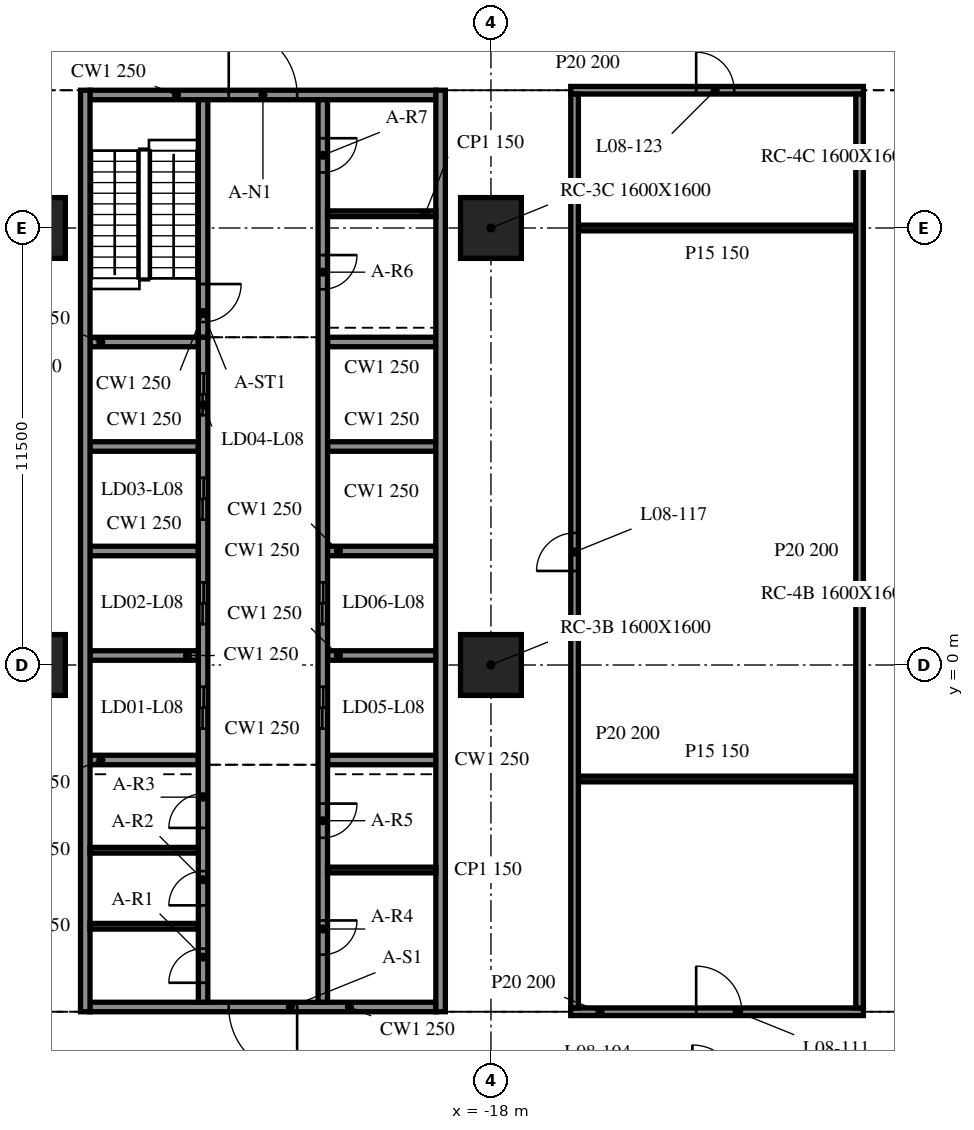
"""IFC4 building model, lengths in metres.
Left out: names, types, materials, properties, quantities, classifications, styles, units other than length and angle.
Written with IfcOpenShell. Run it as: python <this file> out.ifc"""

import sys

from ifc_helpers import new_model, si_unit, direction, frame, frame_2d, origin, origin_2d, place, context, subcontext, project, spatial, rectangle, extrude, element, fill, save


model = new_model("IFC4")
c1 = context("Model", 3, precision=1e-05, world=origin(), true_north=direction((0.0, 1.0)))
c2 = subcontext(c1, "Body", "Model", "MODEL_VIEW")
j1 = project(units=[si_unit("LENGTHUNIT", "METRE"), si_unit("PLANEANGLEUNIT", "RADIAN")], contexts=[c1])
p1 = place(None, origin())
s1 = spatial("IfcSite", under=j1, at=p1, CompositionType="ELEMENT")
p2 = place(p1, origin())
s2 = spatial("IfcBuilding", under=s1, at=p2, CompositionType="ELEMENT")
p3 = place(p2, frame((0.0, 0.0, 37.3)))
s3 = spatial("IfcBuildingStorey", under=s2, at=p3, CompositionType="ELEMENT", Elevation=37.3)
for number, where, z_axis, x_axis in (
    (1, (-30.0, 0.0, -0.34), (0.0, 0.0, 1.0), (1.0, 0.0, 0.0)),
    (2, (-30.0, 11.5, -0.34), (0.0, 0.0, 1.0), (1.0, 0.0, 0.0)),
    (3, (-18.0, 0.0, -0.34), (0.0, 0.0, 1.0), (1.0, 0.0, 0.0)),
    (4, (-18.0, 11.5, -0.34), (0.0, 0.0, 1.0), (1.0, 0.0, 0.0)),
):
    element("IfcColumn", number, at=place(p3, frame(where, z_axis=z_axis, x_axis=x_axis)), inside=s3, PredefinedType="COLUMN", context=c2, shape_type="SweptSolid", body=[
        extrude(rectangle(XDim=1.6, YDim=1.6, at=origin_2d()), origin(), (0.0, 0.0, 1.0), 4.09),
    ])
for number, where, z_axis, x_axis in (
    (5, (-28.675, 15.125, 0.0), (0.0, 0.0, 1.0), (0.0, -1.0, 0.0)),
    (6, (-19.325, -9.125, 0.0), (0.0, 0.0, 1.0), (0.0, 1.0, 0.0)),
):
    element("IfcWall", number, at=place(p3, frame(where, z_axis=z_axis, x_axis=x_axis)), inside=s3, PredefinedType="SOLIDWALL", context=c2, shape_type="SweptSolid", body=[
        extrude(rectangle(XDim=24.25, YDim=0.25, at=frame_2d((12.125, 0.0))), origin(), (0.0, 0.0, 1.0), 3.75),
    ])
p4 = place(p3, frame((-19.45, -9.0, 0.0), z_axis=(0.0, 0.0, 1.0), x_axis=(-1.0, 0.0, 0.0)))
e7 = element("IfcWall", 7, at=p4, inside=s3, PredefinedType="SOLIDWALL", context=c2, shape_type="SweptSolid", body=[
    extrude(rectangle(XDim=9.1, YDim=0.25, at=frame_2d((4.55, 0.0))), origin(), (0.0, 0.0, 1.0), 3.75),
])
p5 = place(p4, frame((3.65, 0.0, 0.0)))
e8 = element("IfcOpeningElement", 8, at=p5, cuts=e7, PredefinedType="OPENING", context=c2, shape_type="SweptSolid", body=[
    extrude(rectangle(XDim=1.8, YDim=2.1, at=frame_2d((0.9, 1.05))), frame((0.0, 0.135, 0.0), z_axis=(0.0, -1.0, 0.0), x_axis=(1.0, 0.0, 0.0)), (0.0, 0.0, 1.0), 0.27),
])
p6 = place(p3, frame((-28.55, 15.0, 0.0), z_axis=(0.0, 0.0, 1.0), x_axis=(1.0, 0.0, 0.0)))
e9 = element("IfcWall", 9, at=p6, inside=s3, PredefinedType="SOLIDWALL", context=c2, shape_type="SweptSolid", body=[
    extrude(rectangle(XDim=9.1, YDim=0.25, at=frame_2d((4.55, 0.0))), origin(), (0.0, 0.0, 1.0), 3.75),
])
p7 = place(p6, frame((3.65, 0.0, 0.0)))
e10 = element("IfcOpeningElement", 10, at=p7, cuts=e9, PredefinedType="OPENING", context=c2, shape_type="SweptSolid", body=[
    extrude(rectangle(XDim=1.8, YDim=2.1, at=frame_2d((0.9, 1.05))), frame((0.0, 0.135, 0.0), z_axis=(0.0, -1.0, 0.0), x_axis=(1.0, 0.0, 0.0)), (0.0, 0.0, 1.0), 0.27),
])
p8 = place(p3, frame((-25.575, -8.875, 0.0), z_axis=(0.0, 0.0, 1.0), x_axis=(0.0, 1.0, 0.0)))
e11 = element("IfcWall", 11, at=p8, inside=s3, PredefinedType="SOLIDWALL", context=c2, shape_type="SweptSolid", body=[
    extrude(rectangle(XDim=17.5, YDim=0.25, at=frame_2d((8.75, 0.0))), origin(), (0.0, 0.0, 1.0), 3.75),
])
p9 = place(p8, frame((7.2, 0.0, 0.0)))
e12 = element("IfcOpeningElement", 12, at=p9, cuts=e11, PredefinedType="OPENING", context=c2, shape_type="SweptSolid", body=[
    extrude(rectangle(XDim=1.1, YDim=2.1, at=frame_2d((0.55, 1.05))), frame((0.0, 0.135, 0.0), z_axis=(0.0, -1.0, 0.0), x_axis=(1.0, 0.0, 0.0)), (0.0, 0.0, 1.0), 0.27),
])
p10 = place(p8, frame((9.95, 0.0, 0.0)))
e13 = element("IfcOpeningElement", 13, at=p10, cuts=e11, PredefinedType="OPENING", context=c2, shape_type="SweptSolid", body=[
    extrude(rectangle(XDim=1.1, YDim=2.1, at=frame_2d((0.55, 1.05))), frame((0.0, 0.135, 0.0), z_axis=(0.0, -1.0, 0.0), x_axis=(1.0, 0.0, 0.0)), (0.0, 0.0, 1.0), 0.27),
])
p11 = place(p8, frame((12.7, 0.0, 0.0)))
e14 = element("IfcOpeningElement", 14, at=p11, cuts=e11, PredefinedType="OPENING", context=c2, shape_type="SweptSolid", body=[
    extrude(rectangle(XDim=1.1, YDim=2.1, at=frame_2d((0.55, 1.05))), frame((0.0, 0.135, 0.0), z_axis=(0.0, -1.0, 0.0), x_axis=(1.0, 0.0, 0.0)), (0.0, 0.0, 1.0), 0.27),
])
p12 = place(p8, frame((15.45, 0.0, 0.0)))
e15 = element("IfcOpeningElement", 15, at=p12, cuts=e11, PredefinedType="OPENING", context=c2, shape_type="SweptSolid", body=[
    extrude(rectangle(XDim=1.1, YDim=2.1, at=frame_2d((0.55, 1.05))), frame((0.0, 0.135, 0.0), z_axis=(0.0, -1.0, 0.0), x_axis=(1.0, 0.0, 0.0)), (0.0, 0.0, 1.0), 0.27),
])
p13 = place(p8, frame((0.512, 0.0, 0.0)))
e16 = element("IfcOpeningElement", 16, at=p13, cuts=e11, PredefinedType="OPENING", context=c2, shape_type="SweptSolid", body=[
    extrude(rectangle(XDim=0.9, YDim=2.1, at=frame_2d((0.45, 1.05))), frame((0.0, 0.135, 0.0), z_axis=(0.0, -1.0, 0.0), x_axis=(1.0, 0.0, 0.0)), (0.0, 0.0, 1.0), 0.27),
])
p14 = place(p8, frame((2.55, 0.0, 0.0)))
e17 = element("IfcOpeningElement", 17, at=p14, cuts=e11, PredefinedType="OPENING", context=c2, shape_type="SweptSolid", body=[
    extrude(rectangle(XDim=0.9, YDim=2.1, at=frame_2d((0.45, 1.05))), frame((0.0, 0.135, 0.0), z_axis=(0.0, -1.0, 0.0), x_axis=(1.0, 0.0, 0.0)), (0.0, 0.0, 1.0), 0.27),
])
p15 = place(p8, frame((4.587, 0.0, 0.0)))
e18 = element("IfcOpeningElement", 18, at=p15, cuts=e11, PredefinedType="OPENING", context=c2, shape_type="SweptSolid", body=[
    extrude(rectangle(XDim=0.9, YDim=2.1, at=frame_2d((0.45, 1.05))), frame((0.0, 0.135, 0.0), z_axis=(0.0, -1.0, 0.0), x_axis=(1.0, 0.0, 0.0)), (0.0, 0.0, 1.0), 0.27),
])
p16 = place(p3, frame((-25.575, 14.875, 0.0), z_axis=(0.0, 0.0, 1.0), x_axis=(0.0, -1.0, 0.0)))
e19 = element("IfcWall", 19, at=p16, inside=s3, PredefinedType="SOLIDWALL", context=c2, shape_type="SweptSolid", body=[
    extrude(rectangle(XDim=6.25, YDim=0.25, at=frame_2d((3.125, 0.0))), origin(), (0.0, 0.0, 1.0), 3.75),
])
p17 = place(p16, frame((4.85, 0.0, 0.0)))
e20 = element("IfcOpeningElement", 20, at=p17, cuts=e19, PredefinedType="OPENING", context=c2, shape_type="SweptSolid", body=[
    extrude(rectangle(XDim=1.0, YDim=2.1, at=frame_2d((0.5, 1.05))), frame((0.0, 0.135, 0.0), z_axis=(0.0, -1.0, 0.0), x_axis=(1.0, 0.0, 0.0)), (0.0, 0.0, 1.0), 0.27),
])
p18 = place(p3, frame((-22.425, 14.875, 0.0), z_axis=(0.0, 0.0, 1.0), x_axis=(0.0, -1.0, 0.0)))
e21 = element("IfcWall", 21, at=p18, inside=s3, PredefinedType="SOLIDWALL", context=c2, shape_type="SweptSolid", body=[
    extrude(rectangle(XDim=23.75, YDim=0.25, at=frame_2d((11.875, 0.0))), origin(), (0.0, 0.0, 1.0), 3.75),
])
p19 = place(p18, frame((15.45, 0.0, 0.0)))
e22 = element("IfcOpeningElement", 22, at=p19, cuts=e21, PredefinedType="OPENING", context=c2, shape_type="SweptSolid", body=[
    extrude(rectangle(XDim=1.1, YDim=2.1, at=frame_2d((0.55, 1.05))), frame((0.0, 0.135, 0.0), z_axis=(0.0, -1.0, 0.0), x_axis=(1.0, 0.0, 0.0)), (0.0, 0.0, 1.0), 0.27),
])
p20 = place(p18, frame((12.7, 0.0, 0.0)))
e23 = element("IfcOpeningElement", 23, at=p20, cuts=e21, PredefinedType="OPENING", context=c2, shape_type="SweptSolid", body=[
    extrude(rectangle(XDim=1.1, YDim=2.1, at=frame_2d((0.55, 1.05))), frame((0.0, 0.135, 0.0), z_axis=(0.0, -1.0, 0.0), x_axis=(1.0, 0.0, 0.0)), (0.0, 0.0, 1.0), 0.27),
])
p21 = place(p18, frame((21.597, 0.0, 0.0)))
e24 = element("IfcOpeningElement", 24, at=p21, cuts=e21, PredefinedType="OPENING", context=c2, shape_type="SweptSolid", body=[
    extrude(rectangle(XDim=0.9, YDim=2.1, at=frame_2d((0.45, 1.05))), frame((0.0, 0.135, 0.0), z_axis=(0.0, -1.0, 0.0), x_axis=(1.0, 0.0, 0.0)), (0.0, 0.0, 1.0), 0.27),
])
p22 = place(p18, frame((18.522, 0.0, 0.0)))
e25 = element("IfcOpeningElement", 25, at=p22, cuts=e21, PredefinedType="OPENING", context=c2, shape_type="SweptSolid", body=[
    extrude(rectangle(XDim=0.9, YDim=2.1, at=frame_2d((0.45, 1.05))), frame((0.0, 0.135, 0.0), z_axis=(0.0, -1.0, 0.0), x_axis=(1.0, 0.0, 0.0)), (0.0, 0.0, 1.0), 0.27),
])
p23 = place(p18, frame((4.087, 0.0, 0.0)))
e26 = element("IfcOpeningElement", 26, at=p23, cuts=e21, PredefinedType="OPENING", context=c2, shape_type="SweptSolid", body=[
    extrude(rectangle(XDim=0.9, YDim=2.1, at=frame_2d((0.45, 1.05))), frame((0.0, 0.135, 0.0), z_axis=(0.0, -1.0, 0.0), x_axis=(1.0, 0.0, 0.0)), (0.0, 0.0, 1.0), 0.27),
])
p24 = place(p18, frame((1.012, 0.0, 0.0)))
e27 = element("IfcOpeningElement", 27, at=p24, cuts=e21, PredefinedType="OPENING", context=c2, shape_type="SweptSolid", body=[
    extrude(rectangle(XDim=0.9, YDim=2.1, at=frame_2d((0.45, 1.05))), frame((0.0, 0.135, 0.0), z_axis=(0.0, -1.0, 0.0), x_axis=(1.0, 0.0, 0.0)), (0.0, 0.0, 1.0), 0.27),
])
for number, where, z_axis, x_axis in (
    (28, (-28.55, -2.5, 0.0), (0.0, 0.0, 1.0), (1.0, 0.0, 0.0)),
    (29, (-28.55, 0.25, 0.0), (0.0, 0.0, 1.0), (1.0, 0.0, 0.0)),
    (30, (-28.55, 3.0, 0.0), (0.0, 0.0, 1.0), (1.0, 0.0, 0.0)),
    (31, (-28.55, 5.75, 0.0), (0.0, 0.0, 1.0), (1.0, 0.0, 0.0)),
    (32, (-28.55, 8.5, 0.0), (0.0, 0.0, 1.0), (1.0, 0.0, 0.0)),
    (33, (-22.3, -2.5, 0.0), (0.0, 0.0, 1.0), (1.0, 0.0, 0.0)),
    (34, (-22.3, 0.25, 0.0), (0.0, 0.0, 1.0), (1.0, 0.0, 0.0)),
    (35, (-22.3, 3.0, 0.0), (0.0, 0.0, 1.0), (1.0, 0.0, 0.0)),
    (36, (-22.3, 5.75, 0.0), (0.0, 0.0, 1.0), (1.0, 0.0, 0.0)),
    (37, (-22.3, 8.5, 0.0), (0.0, 0.0, 1.0), (1.0, 0.0, 0.0)),
):
    element("IfcWall", number, at=place(p3, frame(where, z_axis=z_axis, x_axis=x_axis)), inside=s3, PredefinedType="SOLIDWALL", context=c2, shape_type="SweptSolid", body=[
        extrude(rectangle(XDim=2.85, YDim=0.25, at=frame_2d((1.425, 0.0))), origin(), (0.0, 0.0, 1.0), 3.75),
    ])
for number, where, z_axis, x_axis in (
    (38, (-28.55, -6.875, 0.0), (0.0, 0.0, 1.0), (1.0, 0.0, 0.0)),
    (39, (-28.55, -4.875, 0.0), (0.0, 0.0, 1.0), (1.0, 0.0, 0.0)),
    (40, (-22.3, -5.395, 0.0), (0.0, 0.0, 1.0), (1.0, 0.0, 0.0)),
    (41, (-22.3, 11.875, 0.0), (0.0, 0.0, 1.0), (1.0, 0.0, 0.0)),
):
    element("IfcWall", number, at=place(p3, frame(where, z_axis=z_axis, x_axis=x_axis)), inside=s3, PredefinedType="PARTITIONING", context=c2, shape_type="SweptSolid", body=[
        extrude(rectangle(XDim=2.85, YDim=0.15, at=frame_2d((1.425, 0.0))), origin(), (0.0, 0.0, 1.0), 3.75),
    ])
p25 = place(p3, frame((-15.9, -9.125, 0.0), z_axis=(0.0, 0.0, 1.0), x_axis=(1.0, 0.0, 0.0)))
e42 = element("IfcWall", 42, at=p25, inside=s3, PredefinedType="PARTITIONING", context=c2, shape_type="SweptSolid", body=[
    extrude(rectangle(XDim=7.7, YDim=0.2, at=frame_2d((3.85, 0.0))), origin(), (0.0, 0.0, 1.0), 3.75),
])
p26 = place(p25, frame((3.3, 0.0, 0.0)))
e43 = element("IfcOpeningElement", 43, at=p26, cuts=e42, PredefinedType="OPENING", context=c2, shape_type="SweptSolid", body=[
    extrude(rectangle(XDim=1.2, YDim=2.1, at=frame_2d((0.6, 1.05))), frame((0.0, 0.11, 0.0), z_axis=(0.0, -1.0, 0.0), x_axis=(1.0, 0.0, 0.0)), (0.0, 0.0, 1.0), 0.22),
])
for number, where, z_axis, x_axis in (
    (44, (-15.7, -3.0, 0.0), (0.0, 0.0, 1.0), (1.0, 0.0, 0.0)),
    (45, (-15.7, 11.5, 0.0), (0.0, 0.0, 1.0), (1.0, 0.0, 0.0)),
):
    element("IfcWall", number, at=place(p3, frame(where, z_axis=z_axis, x_axis=x_axis)), inside=s3, PredefinedType="PARTITIONING", context=c2, shape_type="SweptSolid", body=[
        extrude(rectangle(XDim=7.3, YDim=0.15, at=frame_2d((3.65, 0.0))), origin(), (0.0, 0.0, 1.0), 3.75),
    ])
p27 = place(p3, frame((-15.9, 15.125, 0.0), z_axis=(0.0, 0.0, 1.0), x_axis=(1.0, 0.0, 0.0)))
e46 = element("IfcWall", 46, at=p27, inside=s3, PredefinedType="PARTITIONING", context=c2, shape_type="SweptSolid", body=[
    extrude(rectangle(XDim=7.7, YDim=0.2, at=frame_2d((3.85, 0.0))), origin(), (0.0, 0.0, 1.0), 3.75),
])
p28 = place(p27, frame((3.3, 0.0, 0.0)))
e47 = element("IfcOpeningElement", 47, at=p28, cuts=e46, PredefinedType="OPENING", context=c2, shape_type="SweptSolid", body=[
    extrude(rectangle(XDim=1.0, YDim=2.1, at=frame_2d((0.5, 1.05))), frame((0.0, 0.11, 0.0), z_axis=(0.0, -1.0, 0.0), x_axis=(1.0, 0.0, 0.0)), (0.0, 0.0, 1.0), 0.22),
])
p29 = place(p3, frame((-15.8, -9.025, 0.0), z_axis=(0.0, 0.0, 1.0), x_axis=(0.0, 1.0, 0.0)))
e48 = element("IfcWall", 48, at=p29, inside=s3, PredefinedType="PARTITIONING", context=c2, shape_type="SweptSolid", body=[
    extrude(rectangle(XDim=24.05, YDim=0.2, at=frame_2d((12.025, 0.0))), origin(), (0.0, 0.0, 1.0), 3.75),
])
p30 = place(p29, frame((11.5, 0.0, 0.0)))
e49 = element("IfcOpeningElement", 49, at=p30, cuts=e48, PredefinedType="OPENING", context=c2, shape_type="SweptSolid", body=[
    extrude(rectangle(XDim=1.0, YDim=2.1, at=frame_2d((0.5, 1.05))), frame((0.0, 0.11, 0.0), z_axis=(0.0, -1.0, 0.0), x_axis=(1.0, 0.0, 0.0)), (0.0, 0.0, 1.0), 0.22),
])
p31 = place(p3, frame((-8.3, -9.025, 0.0), z_axis=(0.0, 0.0, 1.0), x_axis=(0.0, 1.0, 0.0)))
e50 = element("IfcWall", 50, at=p31, inside=s3, PredefinedType="PARTITIONING", context=c2, shape_type="SweptSolid", body=[
    extrude(rectangle(XDim=24.05, YDim=0.2, at=frame_2d((12.025, 0.0))), origin(), (0.0, 0.0, 1.0), 3.75),
])
p32 = place(p5, origin())
e51 = element("IfcDoor", 51, at=p32, inside=s3, OperationType="DOUBLE_DOOR_SINGLE_SWING", PredefinedType="DOOR", context=c2, shape_type="SweptSolid", body=[
    extrude(rectangle(XDim=1.8, YDim=2.1, at=frame_2d((0.9, 1.05))), frame((0.0, 0.025, 0.0), z_axis=(0.0, -1.0, 0.0), x_axis=(1.0, 0.0, 0.0)), (0.0, 0.0, 1.0), 0.05),
])
fill(e8, e51)
p33 = place(p7, origin())
e52 = element("IfcDoor", 52, at=p33, inside=s3, OperationType="DOUBLE_DOOR_SINGLE_SWING", PredefinedType="DOOR", context=c2, shape_type="SweptSolid", body=[
    extrude(rectangle(XDim=1.8, YDim=2.1, at=frame_2d((0.9, 1.05))), frame((0.0, 0.025, 0.0), z_axis=(0.0, -1.0, 0.0), x_axis=(1.0, 0.0, 0.0)), (0.0, 0.0, 1.0), 0.05),
])
fill(e10, e52)
p34 = place(p19, origin())
e53 = element("IfcDoor", 53, at=p34, inside=s3, OperationType="DOUBLE_DOOR_SLIDING", PredefinedType="DOOR", context=c2, shape_type="SweptSolid", body=[
    extrude(rectangle(XDim=1.1, YDim=2.1, at=frame_2d((0.55, 1.05))), frame((0.0, 0.025, 0.0), z_axis=(0.0, -1.0, 0.0), x_axis=(1.0, 0.0, 0.0)), (0.0, 0.0, 1.0), 0.05),
])
fill(e22, e53)
p35 = place(p20, origin())
e54 = element("IfcDoor", 54, at=p35, inside=s3, OperationType="DOUBLE_DOOR_SLIDING", PredefinedType="DOOR", context=c2, shape_type="SweptSolid", body=[
    extrude(rectangle(XDim=1.1, YDim=2.1, at=frame_2d((0.55, 1.05))), frame((0.0, 0.025, 0.0), z_axis=(0.0, -1.0, 0.0), x_axis=(1.0, 0.0, 0.0)), (0.0, 0.0, 1.0), 0.05),
])
fill(e23, e54)
p36 = place(p9, origin())
e55 = element("IfcDoor", 55, at=p36, inside=s3, OperationType="DOUBLE_DOOR_SLIDING", PredefinedType="DOOR", context=c2, shape_type="SweptSolid", body=[
    extrude(rectangle(XDim=1.1, YDim=2.1, at=frame_2d((0.55, 1.05))), frame((0.0, 0.025, 0.0), z_axis=(0.0, -1.0, 0.0), x_axis=(1.0, 0.0, 0.0)), (0.0, 0.0, 1.0), 0.05),
])
fill(e12, e55)
p37 = place(p10, origin())
e56 = element("IfcDoor", 56, at=p37, inside=s3, OperationType="DOUBLE_DOOR_SLIDING", PredefinedType="DOOR", context=c2, shape_type="SweptSolid", body=[
    extrude(rectangle(XDim=1.1, YDim=2.1, at=frame_2d((0.55, 1.05))), frame((0.0, 0.025, 0.0), z_axis=(0.0, -1.0, 0.0), x_axis=(1.0, 0.0, 0.0)), (0.0, 0.0, 1.0), 0.05),
])
fill(e13, e56)
p38 = place(p11, origin())
e57 = element("IfcDoor", 57, at=p38, inside=s3, OperationType="DOUBLE_DOOR_SLIDING", PredefinedType="DOOR", context=c2, shape_type="SweptSolid", body=[
    extrude(rectangle(XDim=1.1, YDim=2.1, at=frame_2d((0.55, 1.05))), frame((0.0, 0.025, 0.0), z_axis=(0.0, -1.0, 0.0), x_axis=(1.0, 0.0, 0.0)), (0.0, 0.0, 1.0), 0.05),
])
fill(e14, e57)
p39 = place(p12, origin())
e58 = element("IfcDoor", 58, at=p39, inside=s3, OperationType="DOUBLE_DOOR_SLIDING", PredefinedType="DOOR", context=c2, shape_type="SweptSolid", body=[
    extrude(rectangle(XDim=1.1, YDim=2.1, at=frame_2d((0.55, 1.05))), frame((0.0, 0.025, 0.0), z_axis=(0.0, -1.0, 0.0), x_axis=(1.0, 0.0, 0.0)), (0.0, 0.0, 1.0), 0.05),
])
fill(e15, e58)
p40 = place(p13, origin())
e59 = element("IfcDoor", 59, at=p40, inside=s3, OperationType="SINGLE_SWING_LEFT", PredefinedType="DOOR", context=c2, shape_type="SweptSolid", body=[
    extrude(rectangle(XDim=0.9, YDim=2.1, at=frame_2d((0.45, 1.05))), frame((0.0, 0.025, 0.0), z_axis=(0.0, -1.0, 0.0), x_axis=(1.0, 0.0, 0.0)), (0.0, 0.0, 1.0), 0.05),
])
fill(e16, e59)
p41 = place(p14, origin())
e60 = element("IfcDoor", 60, at=p41, inside=s3, OperationType="SINGLE_SWING_RIGHT", PredefinedType="DOOR", context=c2, shape_type="SweptSolid", body=[
    extrude(rectangle(XDim=0.9, YDim=2.1, at=frame_2d((0.45, 1.05))), frame((0.0, 0.025, 0.0), z_axis=(0.0, -1.0, 0.0), x_axis=(1.0, 0.0, 0.0)), (0.0, 0.0, 1.0), 0.05),
])
fill(e17, e60)
p42 = place(p15, origin())
e61 = element("IfcDoor", 61, at=p42, inside=s3, OperationType="SINGLE_SWING_LEFT", PredefinedType="DOOR", context=c2, shape_type="SweptSolid", body=[
    extrude(rectangle(XDim=0.9, YDim=2.1, at=frame_2d((0.45, 1.05))), frame((0.0, 0.025, 0.0), z_axis=(0.0, -1.0, 0.0), x_axis=(1.0, 0.0, 0.0)), (0.0, 0.0, 1.0), 0.05),
])
fill(e18, e61)
p43 = place(p21, origin())
e62 = element("IfcDoor", 62, at=p43, inside=s3, OperationType="SINGLE_SWING_RIGHT", PredefinedType="DOOR", context=c2, shape_type="SweptSolid", body=[
    extrude(rectangle(XDim=0.9, YDim=2.1, at=frame_2d((0.45, 1.05))), frame((0.0, 0.025, 0.0), z_axis=(0.0, -1.0, 0.0), x_axis=(1.0, 0.0, 0.0)), (0.0, 0.0, 1.0), 0.05),
])
fill(e24, e62)
p44 = place(p22, origin())
e63 = element("IfcDoor", 63, at=p44, inside=s3, OperationType="SINGLE_SWING_LEFT", PredefinedType="DOOR", context=c2, shape_type="SweptSolid", body=[
    extrude(rectangle(XDim=0.9, YDim=2.1, at=frame_2d((0.45, 1.05))), frame((0.0, 0.025, 0.0), z_axis=(0.0, -1.0, 0.0), x_axis=(1.0, 0.0, 0.0)), (0.0, 0.0, 1.0), 0.05),
])
fill(e25, e63)
p45 = place(p23, origin())
e64 = element("IfcDoor", 64, at=p45, inside=s3, OperationType="SINGLE_SWING_RIGHT", PredefinedType="DOOR", context=c2, shape_type="SweptSolid", body=[
    extrude(rectangle(XDim=0.9, YDim=2.1, at=frame_2d((0.45, 1.05))), frame((0.0, 0.025, 0.0), z_axis=(0.0, -1.0, 0.0), x_axis=(1.0, 0.0, 0.0)), (0.0, 0.0, 1.0), 0.05),
])
fill(e26, e64)
p46 = place(p24, origin())
e65 = element("IfcDoor", 65, at=p46, inside=s3, OperationType="SINGLE_SWING_LEFT", PredefinedType="DOOR", context=c2, shape_type="SweptSolid", body=[
    extrude(rectangle(XDim=0.9, YDim=2.1, at=frame_2d((0.45, 1.05))), frame((0.0, 0.025, 0.0), z_axis=(0.0, -1.0, 0.0), x_axis=(1.0, 0.0, 0.0)), (0.0, 0.0, 1.0), 0.05),
])
fill(e27, e65)
p47 = place(p17, origin())
e66 = element("IfcDoor", 66, at=p47, inside=s3, OperationType="SINGLE_SWING_RIGHT", PredefinedType="DOOR", context=c2, shape_type="SweptSolid", body=[
    extrude(rectangle(XDim=1.0, YDim=2.1, at=frame_2d((0.5, 1.05))), frame((0.0, 0.025, 0.0), z_axis=(0.0, -1.0, 0.0), x_axis=(1.0, 0.0, 0.0)), (0.0, 0.0, 1.0), 0.05),
])
fill(e20, e66)
p48 = place(p26, origin())
e67 = element("IfcDoor", 67, at=p48, inside=s3, OperationType="SINGLE_SWING_RIGHT", PredefinedType="DOOR", context=c2, shape_type="SweptSolid", body=[
    extrude(rectangle(XDim=1.2, YDim=2.1, at=frame_2d((0.6, 1.05))), frame((0.0, 0.025, 0.0), z_axis=(0.0, -1.0, 0.0), x_axis=(1.0, 0.0, 0.0)), (0.0, 0.0, 1.0), 0.05),
])
fill(e43, e67)
p49 = place(p30, origin())
e68 = element("IfcDoor", 68, at=p49, inside=s3, OperationType="SINGLE_SWING_RIGHT", PredefinedType="DOOR", context=c2, shape_type="SweptSolid", body=[
    extrude(rectangle(XDim=1.0, YDim=2.1, at=frame_2d((0.5, 1.05))), frame((0.0, 0.025, 0.0), z_axis=(0.0, -1.0, 0.0), x_axis=(1.0, 0.0, 0.0)), (0.0, 0.0, 1.0), 0.05),
])
fill(e49, e68)
p50 = place(p28, origin())
e69 = element("IfcDoor", 69, at=p50, inside=s3, OperationType="SINGLE_SWING_RIGHT", PredefinedType="DOOR", context=c2, shape_type="SweptSolid", body=[
    extrude(rectangle(XDim=1.0, YDim=2.1, at=frame_2d((0.5, 1.05))), frame((0.0, 0.025, 0.0), z_axis=(0.0, -1.0, 0.0), x_axis=(1.0, 0.0, 0.0)), (0.0, 0.0, 1.0), 0.05),
])
fill(e47, e69)
save(model, sys.argv[1])
